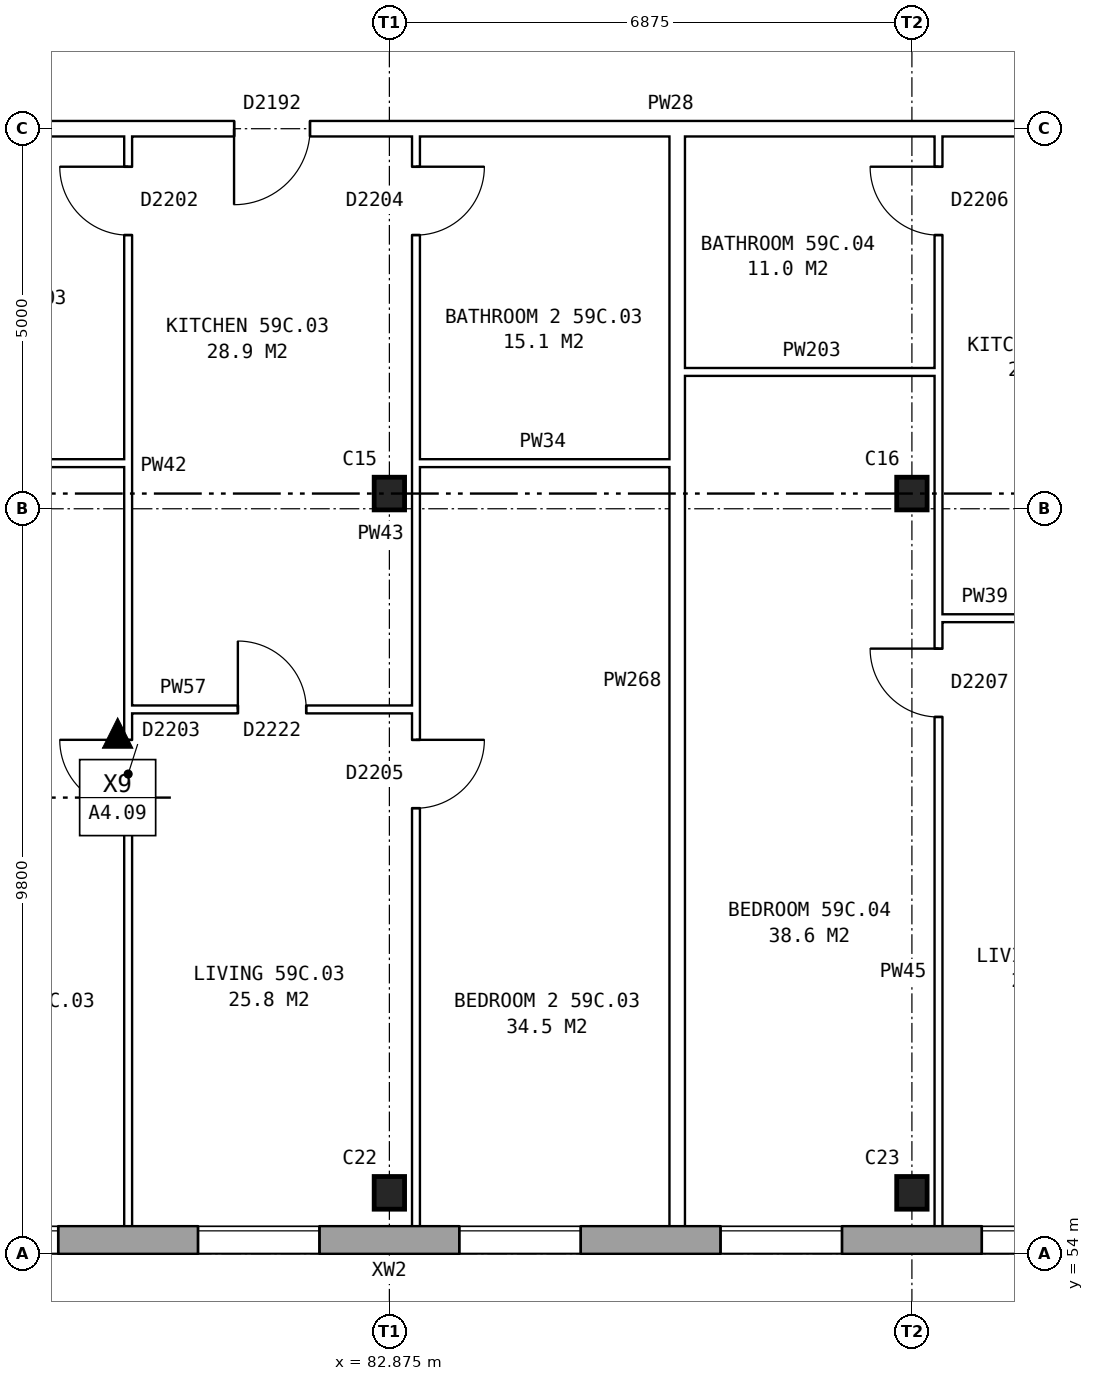
"""IFC4 building model, lengths in metres.
Left out: names, types, materials, properties, quantities, classifications, styles, units other than length and angle.
Written with IfcOpenShell. Run it as: python <this file> out.ifc"""

import sys

from ifc_helpers import new_model, si_unit, direction, frame, frame_2d, origin, origin_2d, place, context, subcontext, project, spatial, rectangle, i_section, extrude, element, fill, save


model = new_model("IFC4")
c1 = context("Model", 3, precision=1e-05, world=origin(), true_north=direction((0.0, 1.0)))
c2 = subcontext(c1, "Body", "Model", "MODEL_VIEW")
j1 = project(units=[si_unit("LENGTHUNIT", "METRE"), si_unit("PLANEANGLEUNIT", "RADIAN")], contexts=[c1])
p1 = place(None, origin())
s1 = spatial("IfcSite", under=j1, at=p1, CompositionType="ELEMENT")
p2 = place(p1, origin())
s2 = spatial("IfcBuilding", under=s1, at=p2, CompositionType="ELEMENT")
p3 = place(p2, frame((0.0, 0.0, 209.0)))
s3 = spatial("IfcBuildingStorey", under=s2, at=p3, CompositionType="ELEMENT", Elevation=209.0)
for number, where, z_axis, x_axis in (
    (1, (82.875, 54.8, 0.0), (0.0, 0.0, 1.0), (1.0, 0.0, 0.0)),
    (2, (89.75, 54.8, 0.0), (0.0, 0.0, 1.0), (1.0, 0.0, 0.0)),
    (3, (82.875, 64.0, 0.0), (0.0, 0.0, 1.0), (1.0, 0.0, 0.0)),
    (4, (89.75, 64.0, 0.0), (0.0, 0.0, 1.0), (1.0, 0.0, 0.0)),
):
    element("IfcColumn", number, at=place(p3, frame(where, z_axis=z_axis, x_axis=x_axis)), inside=s3, PredefinedType="COLUMN", context=c2, shape_type="SweptSolid", body=[
        extrude(i_section(OverallWidth=0.4, OverallDepth=0.43, WebThickness=0.04, FlangeThickness=0.04, at=origin_2d()), origin(), (0.0, 0.0, 1.0), 2.85),
    ])
p4 = place(p3, frame((75.95, 54.18, 0.0), z_axis=(0.0, 0.0, 1.0), x_axis=(1.0, 0.0, 0.0)))
e5 = element("IfcWall", 5, at=p4, inside=s3, PredefinedType="STANDARD", context=c2, shape_type="SweptSolid", body=[
    extrude(rectangle(XDim=55.1, YDim=0.36, at=frame_2d((27.55, 0.0))), origin(), (0.0, 0.0, 1.0), 2.85),
])
p5 = place(p4, frame((0.969, 0.0, 0.8)))
e6 = element("IfcOpeningElement", 6, at=p5, cuts=e5, PredefinedType="OPENING", context=c2, shape_type="SweptSolid", body=[
    extrude(rectangle(XDim=1.6, YDim=1.8, at=frame_2d((0.8, 0.9))), frame((0.0, 0.19, 0.0), z_axis=(0.0, -1.0, 0.0), x_axis=(1.0, 0.0, 0.0)), (0.0, 0.0, 1.0), 0.38),
])
p6 = place(p4, frame((4.406, 0.0, 0.8)))
e7 = element("IfcOpeningElement", 7, at=p6, cuts=e5, PredefinedType="OPENING", context=c2, shape_type="SweptSolid", body=[
    extrude(rectangle(XDim=1.6, YDim=1.8, at=frame_2d((0.8, 0.9))), frame((0.0, 0.19, 0.0), z_axis=(0.0, -1.0, 0.0), x_axis=(1.0, 0.0, 0.0)), (0.0, 0.0, 1.0), 0.38),
])
p7 = place(p4, frame((7.844, 0.0, 0.8)))
e8 = element("IfcOpeningElement", 8, at=p7, cuts=e5, PredefinedType="OPENING", context=c2, shape_type="SweptSolid", body=[
    extrude(rectangle(XDim=1.6, YDim=1.8, at=frame_2d((0.8, 0.9))), frame((0.0, 0.19, 0.0), z_axis=(0.0, -1.0, 0.0), x_axis=(1.0, 0.0, 0.0)), (0.0, 0.0, 1.0), 0.38),
])
p8 = place(p4, frame((11.281, 0.0, 0.8)))
e9 = element("IfcOpeningElement", 9, at=p8, cuts=e5, PredefinedType="OPENING", context=c2, shape_type="SweptSolid", body=[
    extrude(rectangle(XDim=1.6, YDim=1.8, at=frame_2d((0.8, 0.9))), frame((0.0, 0.19, 0.0), z_axis=(0.0, -1.0, 0.0), x_axis=(1.0, 0.0, 0.0)), (0.0, 0.0, 1.0), 0.38),
])
p9 = place(p4, frame((14.719, 0.0, 0.8)))
e10 = element("IfcOpeningElement", 10, at=p9, cuts=e5, PredefinedType="OPENING", context=c2, shape_type="SweptSolid", body=[
    extrude(rectangle(XDim=1.6, YDim=1.8, at=frame_2d((0.8, 0.9))), frame((0.0, 0.19, 0.0), z_axis=(0.0, -1.0, 0.0), x_axis=(1.0, 0.0, 0.0)), (0.0, 0.0, 1.0), 0.38),
])
p10 = place(p4, frame((18.156, 0.0, 0.8)))
e11 = element("IfcOpeningElement", 11, at=p10, cuts=e5, PredefinedType="OPENING", context=c2, shape_type="SweptSolid", body=[
    extrude(rectangle(XDim=1.6, YDim=1.8, at=frame_2d((0.8, 0.9))), frame((0.0, 0.19, 0.0), z_axis=(0.0, -1.0, 0.0), x_axis=(1.0, 0.0, 0.0)), (0.0, 0.0, 1.0), 0.38),
])
p11 = place(p4, frame((21.594, 0.0, 0.8)))
e12 = element("IfcOpeningElement", 12, at=p11, cuts=e5, PredefinedType="OPENING", context=c2, shape_type="SweptSolid", body=[
    extrude(rectangle(XDim=1.6, YDim=1.8, at=frame_2d((0.8, 0.9))), frame((0.0, 0.19, 0.0), z_axis=(0.0, -1.0, 0.0), x_axis=(1.0, 0.0, 0.0)), (0.0, 0.0, 1.0), 0.38),
])
p12 = place(p4, frame((25.031, 0.0, 0.8)))
e13 = element("IfcOpeningElement", 13, at=p12, cuts=e5, PredefinedType="OPENING", context=c2, shape_type="SweptSolid", body=[
    extrude(rectangle(XDim=1.6, YDim=1.8, at=frame_2d((0.8, 0.9))), frame((0.0, 0.19, 0.0), z_axis=(0.0, -1.0, 0.0), x_axis=(1.0, 0.0, 0.0)), (0.0, 0.0, 1.0), 0.38),
])
p13 = place(p4, frame((28.469, 0.0, 0.8)))
e14 = element("IfcOpeningElement", 14, at=p13, cuts=e5, PredefinedType="OPENING", context=c2, shape_type="SweptSolid", body=[
    extrude(rectangle(XDim=1.6, YDim=1.8, at=frame_2d((0.8, 0.9))), frame((0.0, 0.19, 0.0), z_axis=(0.0, -1.0, 0.0), x_axis=(1.0, 0.0, 0.0)), (0.0, 0.0, 1.0), 0.38),
])
p14 = place(p4, frame((31.906, 0.0, 0.8)))
e15 = element("IfcOpeningElement", 15, at=p14, cuts=e5, PredefinedType="OPENING", context=c2, shape_type="SweptSolid", body=[
    extrude(rectangle(XDim=1.6, YDim=1.8, at=frame_2d((0.8, 0.9))), frame((0.0, 0.19, 0.0), z_axis=(0.0, -1.0, 0.0), x_axis=(1.0, 0.0, 0.0)), (0.0, 0.0, 1.0), 0.38),
])
p15 = place(p4, frame((35.344, 0.0, 0.8)))
e16 = element("IfcOpeningElement", 16, at=p15, cuts=e5, PredefinedType="OPENING", context=c2, shape_type="SweptSolid", body=[
    extrude(rectangle(XDim=1.6, YDim=1.8, at=frame_2d((0.8, 0.9))), frame((0.0, 0.19, 0.0), z_axis=(0.0, -1.0, 0.0), x_axis=(1.0, 0.0, 0.0)), (0.0, 0.0, 1.0), 0.38),
])
p16 = place(p4, frame((38.781, 0.0, 0.8)))
e17 = element("IfcOpeningElement", 17, at=p16, cuts=e5, PredefinedType="OPENING", context=c2, shape_type="SweptSolid", body=[
    extrude(rectangle(XDim=1.6, YDim=1.8, at=frame_2d((0.8, 0.9))), frame((0.0, 0.19, 0.0), z_axis=(0.0, -1.0, 0.0), x_axis=(1.0, 0.0, 0.0)), (0.0, 0.0, 1.0), 0.38),
])
p17 = place(p4, frame((42.219, 0.0, 0.8)))
e18 = element("IfcOpeningElement", 18, at=p17, cuts=e5, PredefinedType="OPENING", context=c2, shape_type="SweptSolid", body=[
    extrude(rectangle(XDim=1.6, YDim=1.8, at=frame_2d((0.8, 0.9))), frame((0.0, 0.19, 0.0), z_axis=(0.0, -1.0, 0.0), x_axis=(1.0, 0.0, 0.0)), (0.0, 0.0, 1.0), 0.38),
])
p18 = place(p4, frame((45.656, 0.0, 0.8)))
e19 = element("IfcOpeningElement", 19, at=p18, cuts=e5, PredefinedType="OPENING", context=c2, shape_type="SweptSolid", body=[
    extrude(rectangle(XDim=1.6, YDim=1.8, at=frame_2d((0.8, 0.9))), frame((0.0, 0.19, 0.0), z_axis=(0.0, -1.0, 0.0), x_axis=(1.0, 0.0, 0.0)), (0.0, 0.0, 1.0), 0.38),
])
p19 = place(p4, frame((49.094, 0.0, 0.8)))
e20 = element("IfcOpeningElement", 20, at=p19, cuts=e5, PredefinedType="OPENING", context=c2, shape_type="SweptSolid", body=[
    extrude(rectangle(XDim=1.6, YDim=1.8, at=frame_2d((0.8, 0.9))), frame((0.0, 0.19, 0.0), z_axis=(0.0, -1.0, 0.0), x_axis=(1.0, 0.0, 0.0)), (0.0, 0.0, 1.0), 0.38),
])
p20 = place(p4, frame((52.531, 0.0, 0.8)))
e21 = element("IfcOpeningElement", 21, at=p20, cuts=e5, PredefinedType="OPENING", context=c2, shape_type="SweptSolid", body=[
    extrude(rectangle(XDim=1.6, YDim=1.8, at=frame_2d((0.8, 0.9))), frame((0.0, 0.19, 0.0), z_axis=(0.0, -1.0, 0.0), x_axis=(1.0, 0.0, 0.0)), (0.0, 0.0, 1.0), 0.38),
])
p21 = place(p3, frame((79.438, 61.16, 0.0), z_axis=(0.0, 0.0, 1.0), x_axis=(1.0, 0.0, 0.0)))
e22 = element("IfcWall", 22, at=p21, inside=s3, PredefinedType="PARTITIONING", context=c2, shape_type="SweptSolid", body=[
    extrude(rectangle(XDim=3.787, YDim=0.1, at=frame_2d((1.894, 0.0))), origin(), (0.0, 0.0, 1.0), 2.85),
])
p22 = place(p21, frame((1.444, 0.0, 0.0)))
e23 = element("IfcOpeningElement", 23, at=p22, cuts=e22, PredefinedType="OPENING", context=c2, shape_type="SweptSolid", body=[
    extrude(rectangle(XDim=0.9, YDim=2.1, at=frame_2d((0.45, 1.05))), frame((0.0, 0.06, 0.0), z_axis=(0.0, -1.0, 0.0), x_axis=(1.0, 0.0, 0.0)), (0.0, 0.0, 1.0), 0.12),
])
p23 = place(p3, frame((90.1, 62.36, 0.0), z_axis=(0.0, 0.0, 1.0), x_axis=(1.0, 0.0, 0.0)))
e24 = element("IfcWall", 24, at=p23, inside=s3, PredefinedType="PARTITIONING", context=c2, shape_type="SweptSolid", body=[
    extrude(rectangle(XDim=3.337, YDim=0.1, at=frame_2d((1.668, 0.0))), origin(), (0.0, 0.0, 1.0), 2.85),
])
p24 = place(p23, frame((1.219, 0.0, 0.0)))
e25 = element("IfcOpeningElement", 25, at=p24, cuts=e24, PredefinedType="OPENING", context=c2, shape_type="SweptSolid", body=[
    extrude(rectangle(XDim=0.9, YDim=2.1, at=frame_2d((0.45, 1.05))), frame((0.0, 0.06, 0.0), z_axis=(0.0, -1.0, 0.0), x_axis=(1.0, 0.0, 0.0)), (0.0, 0.0, 1.0), 0.12),
])
p25 = place(p3, frame((75.64, 64.4, 0.0), z_axis=(0.0, 0.0, 1.0), x_axis=(1.0, 0.0, 0.0)))
e26 = element("IfcWall", 26, at=p25, inside=s3, PredefinedType="PARTITIONING", context=c2, shape_type="SweptSolid", body=[
    extrude(rectangle(XDim=3.798, YDim=0.1, at=frame_2d((1.899, 0.0))), origin(), (0.0, 0.0, 1.0), 2.85),
])
p26 = place(p3, frame((83.225, 64.4, 0.0), z_axis=(0.0, 0.0, 1.0), x_axis=(1.0, 0.0, 0.0)))
e27 = element("IfcWall", 27, at=p26, inside=s3, PredefinedType="PARTITIONING", context=c2, shape_type="SweptSolid", body=[
    extrude(rectangle(XDim=3.337, YDim=0.1, at=frame_2d((1.668, 0.0))), origin(), (0.0, 0.0, 1.0), 2.85),
])
p27 = place(p3, frame((86.762, 65.6, 0.0), z_axis=(0.0, 0.0, 1.0), x_axis=(1.0, 0.0, 0.0)))
e28 = element("IfcWall", 28, at=p27, inside=s3, PredefinedType="PARTITIONING", context=c2, shape_type="SweptSolid", body=[
    extrude(rectangle(XDim=3.338, YDim=0.1, at=frame_2d((1.669, 0.0))), origin(), (0.0, 0.0, 1.0), 2.85),
])
p28 = place(p3, frame((75.64, 68.8, 0.0), z_axis=(0.0, 0.0, 1.0), x_axis=(1.0, 0.0, 0.0)))
e29 = element("IfcWall", 29, at=p28, inside=s3, PredefinedType="PARTITIONING", context=c2, shape_type="SweptSolid", body=[
    extrude(rectangle(XDim=55.72, YDim=0.2, at=frame_2d((27.86, 0.0))), origin(), (0.0, 0.0, 1.0), 2.85),
])
p29 = place(p28, frame((5.191, 0.0, 0.0)))
e30 = element("IfcOpeningElement", 30, at=p29, cuts=e29, PredefinedType="OPENING", context=c2, shape_type="SweptSolid", body=[
    extrude(rectangle(XDim=1.0, YDim=2.1, at=frame_2d((0.5, 1.05))), frame((0.0, 0.11, 0.0), z_axis=(0.0, -1.0, 0.0), x_axis=(1.0, 0.0, 0.0)), (0.0, 0.0, 1.0), 0.22),
])
p30 = place(p28, frame((15.678, 0.0, 0.0)))
e31 = element("IfcOpeningElement", 31, at=p30, cuts=e29, PredefinedType="OPENING", context=c2, shape_type="SweptSolid", body=[
    extrude(rectangle(XDim=1.0, YDim=2.1, at=frame_2d((0.5, 1.05))), frame((0.0, 0.11, 0.0), z_axis=(0.0, -1.0, 0.0), x_axis=(1.0, 0.0, 0.0)), (0.0, 0.0, 1.0), 0.22),
])
p31 = place(p28, frame((22.553, 0.0, 0.0)))
e32 = element("IfcOpeningElement", 32, at=p31, cuts=e29, PredefinedType="OPENING", context=c2, shape_type="SweptSolid", body=[
    extrude(rectangle(XDim=1.0, YDim=2.1, at=frame_2d((0.5, 1.05))), frame((0.0, 0.11, 0.0), z_axis=(0.0, -1.0, 0.0), x_axis=(1.0, 0.0, 0.0)), (0.0, 0.0, 1.0), 0.22),
])
p32 = place(p28, frame((32.866, 0.0, 0.0)))
e33 = element("IfcOpeningElement", 33, at=p32, cuts=e29, PredefinedType="OPENING", context=c2, shape_type="SweptSolid", body=[
    extrude(rectangle(XDim=1.0, YDim=2.1, at=frame_2d((0.5, 1.05))), frame((0.0, 0.11, 0.0), z_axis=(0.0, -1.0, 0.0), x_axis=(1.0, 0.0, 0.0)), (0.0, 0.0, 1.0), 0.22),
])
p33 = place(p28, frame((43.178, 0.0, 0.0)))
e34 = element("IfcOpeningElement", 34, at=p33, cuts=e29, PredefinedType="OPENING", context=c2, shape_type="SweptSolid", body=[
    extrude(rectangle(XDim=1.0, YDim=2.1, at=frame_2d((0.5, 1.05))), frame((0.0, 0.11, 0.0), z_axis=(0.0, -1.0, 0.0), x_axis=(1.0, 0.0, 0.0)), (0.0, 0.0, 1.0), 0.22),
])
p34 = place(p28, frame((50.053, 0.0, 0.0)))
e35 = element("IfcOpeningElement", 35, at=p34, cuts=e29, PredefinedType="OPENING", context=c2, shape_type="SweptSolid", body=[
    extrude(rectangle(XDim=1.0, YDim=2.1, at=frame_2d((0.5, 1.05))), frame((0.0, 0.11, 0.0), z_axis=(0.0, -1.0, 0.0), x_axis=(1.0, 0.0, 0.0)), (0.0, 0.0, 1.0), 0.22),
])
p35 = place(p3, frame((79.438, 54.36, 0.0), z_axis=(0.0, 0.0, 1.0), x_axis=(0.0, 1.0, 0.0)))
e36 = element("IfcWall", 36, at=p35, inside=s3, PredefinedType="PARTITIONING", context=c2, shape_type="SweptSolid", body=[
    extrude(rectangle(XDim=14.34, YDim=0.1, at=frame_2d((7.17, 0.0))), origin(), (0.0, 0.0, 1.0), 2.85),
])
p36 = place(p35, frame((5.5, 0.0, 0.0)))
e37 = element("IfcOpeningElement", 37, at=p36, cuts=e36, PredefinedType="OPENING", context=c2, shape_type="SweptSolid", body=[
    extrude(rectangle(XDim=0.9, YDim=2.1, at=frame_2d((0.45, 1.05))), frame((0.0, 0.06, 0.0), z_axis=(0.0, -1.0, 0.0), x_axis=(1.0, 0.0, 0.0)), (0.0, 0.0, 1.0), 0.12),
])
p37 = place(p35, frame((13.04, 0.0, 0.0)))
e38 = element("IfcOpeningElement", 38, at=p37, cuts=e36, PredefinedType="OPENING", context=c2, shape_type="SweptSolid", body=[
    extrude(rectangle(XDim=0.9, YDim=2.1, at=frame_2d((0.45, 1.05))), frame((0.0, 0.06, 0.0), z_axis=(0.0, -1.0, 0.0), x_axis=(1.0, 0.0, 0.0)), (0.0, 0.0, 1.0), 0.12),
])
p38 = place(p3, frame((83.225, 54.36, 0.0), z_axis=(0.0, 0.0, 1.0), x_axis=(0.0, 1.0, 0.0)))
e39 = element("IfcWall", 39, at=p38, inside=s3, PredefinedType="PARTITIONING", context=c2, shape_type="SweptSolid", body=[
    extrude(rectangle(XDim=14.34, YDim=0.1, at=frame_2d((7.17, 0.0))), origin(), (0.0, 0.0, 1.0), 2.85),
])
p39 = place(p38, frame((5.5, 0.0, 0.0)))
e40 = element("IfcOpeningElement", 40, at=p39, cuts=e39, PredefinedType="OPENING", context=c2, shape_type="SweptSolid", body=[
    extrude(rectangle(XDim=0.9, YDim=2.1, at=frame_2d((0.45, 1.05))), frame((0.0, 0.06, 0.0), z_axis=(0.0, -1.0, 0.0), x_axis=(1.0, 0.0, 0.0)), (0.0, 0.0, 1.0), 0.12),
])
p40 = place(p38, frame((13.04, 0.0, 0.0)))
e41 = element("IfcOpeningElement", 41, at=p40, cuts=e39, PredefinedType="OPENING", context=c2, shape_type="SweptSolid", body=[
    extrude(rectangle(XDim=0.9, YDim=2.1, at=frame_2d((0.45, 1.05))), frame((0.0, 0.06, 0.0), z_axis=(0.0, -1.0, 0.0), x_axis=(1.0, 0.0, 0.0)), (0.0, 0.0, 1.0), 0.12),
])
p41 = place(p3, frame((86.662, 54.36, 0.0), z_axis=(0.0, 0.0, 1.0), x_axis=(0.0, 1.0, 0.0)))
e42 = element("IfcWall", 42, at=p41, inside=s3, PredefinedType="PARTITIONING", context=c2, shape_type="SweptSolid", body=[
    extrude(rectangle(XDim=14.34, YDim=0.2, at=frame_2d((7.17, 0.0))), origin(), (0.0, 0.0, 1.0), 2.85),
])
p42 = place(p3, frame((90.1, 54.36, 0.0), z_axis=(0.0, 0.0, 1.0), x_axis=(0.0, 1.0, 0.0)))
e43 = element("IfcWall", 43, at=p42, inside=s3, PredefinedType="PARTITIONING", context=c2, shape_type="SweptSolid", body=[
    extrude(rectangle(XDim=14.34, YDim=0.1, at=frame_2d((7.17, 0.0))), origin(), (0.0, 0.0, 1.0), 2.85),
])
p43 = place(p42, frame((6.7, 0.0, 0.0)))
e44 = element("IfcOpeningElement", 44, at=p43, cuts=e43, PredefinedType="OPENING", context=c2, shape_type="SweptSolid", body=[
    extrude(rectangle(XDim=0.9, YDim=2.1, at=frame_2d((0.45, 1.05))), frame((0.0, 0.06, 0.0), z_axis=(0.0, -1.0, 0.0), x_axis=(1.0, 0.0, 0.0)), (0.0, 0.0, 1.0), 0.12),
])
p44 = place(p42, frame((13.04, 0.0, 0.0)))
e45 = element("IfcOpeningElement", 45, at=p44, cuts=e43, PredefinedType="OPENING", context=c2, shape_type="SweptSolid", body=[
    extrude(rectangle(XDim=0.9, YDim=2.1, at=frame_2d((0.45, 1.05))), frame((0.0, 0.06, 0.0), z_axis=(0.0, -1.0, 0.0), x_axis=(1.0, 0.0, 0.0)), (0.0, 0.0, 1.0), 0.12),
])
p45 = place(p5, origin())
e46 = element("IfcWindow", 46, at=p45, inside=s3, PartitioningType="SINGLE_PANEL", PredefinedType="WINDOW", context=c2, shape_type="SweptSolid", body=[
    extrude(rectangle(XDim=1.6, YDim=1.8, at=frame_2d((0.8, 0.9))), frame((0.0, 0.15, 0.0), z_axis=(0.0, -1.0, 0.0), x_axis=(1.0, 0.0, 0.0)), (0.0, 0.0, 1.0), 0.06),
])
fill(e6, e46)
p46 = place(p6, origin())
e47 = element("IfcWindow", 47, at=p46, inside=s3, PartitioningType="SINGLE_PANEL", PredefinedType="WINDOW", context=c2, shape_type="SweptSolid", body=[
    extrude(rectangle(XDim=1.6, YDim=1.8, at=frame_2d((0.8, 0.9))), frame((0.0, 0.15, 0.0), z_axis=(0.0, -1.0, 0.0), x_axis=(1.0, 0.0, 0.0)), (0.0, 0.0, 1.0), 0.06),
])
fill(e7, e47)
p47 = place(p7, origin())
e48 = element("IfcWindow", 48, at=p47, inside=s3, PartitioningType="SINGLE_PANEL", PredefinedType="WINDOW", context=c2, shape_type="SweptSolid", body=[
    extrude(rectangle(XDim=1.6, YDim=1.8, at=frame_2d((0.8, 0.9))), frame((0.0, 0.15, 0.0), z_axis=(0.0, -1.0, 0.0), x_axis=(1.0, 0.0, 0.0)), (0.0, 0.0, 1.0), 0.06),
])
fill(e8, e48)
p48 = place(p8, origin())
e49 = element("IfcWindow", 49, at=p48, inside=s3, PartitioningType="SINGLE_PANEL", PredefinedType="WINDOW", context=c2, shape_type="SweptSolid", body=[
    extrude(rectangle(XDim=1.6, YDim=1.8, at=frame_2d((0.8, 0.9))), frame((0.0, 0.15, 0.0), z_axis=(0.0, -1.0, 0.0), x_axis=(1.0, 0.0, 0.0)), (0.0, 0.0, 1.0), 0.06),
])
fill(e9, e49)
p49 = place(p9, origin())
e50 = element("IfcWindow", 50, at=p49, inside=s3, PartitioningType="SINGLE_PANEL", PredefinedType="WINDOW", context=c2, shape_type="SweptSolid", body=[
    extrude(rectangle(XDim=1.6, YDim=1.8, at=frame_2d((0.8, 0.9))), frame((0.0, 0.15, 0.0), z_axis=(0.0, -1.0, 0.0), x_axis=(1.0, 0.0, 0.0)), (0.0, 0.0, 1.0), 0.06),
])
fill(e10, e50)
p50 = place(p36, origin())
e51 = element("IfcDoor", 51, at=p50, inside=s3, OperationType="SINGLE_SWING_RIGHT", PredefinedType="DOOR", context=c2, shape_type="SweptSolid", body=[
    extrude(rectangle(XDim=0.9, YDim=2.1, at=frame_2d((0.45, 1.05))), frame((0.0, 0.025, 0.0), z_axis=(0.0, -1.0, 0.0), x_axis=(1.0, 0.0, 0.0)), (0.0, 0.0, 1.0), 0.05),
])
fill(e37, e51)
p51 = place(p39, frame((0.9, 0.0, 0.0), z_axis=(0.0, 0.0, 1.0), x_axis=(-1.0, 0.0, 0.0)))
e52 = element("IfcDoor", 52, at=p51, inside=s3, OperationType="SINGLE_SWING_LEFT", PredefinedType="DOOR", context=c2, shape_type="SweptSolid", body=[
    extrude(rectangle(XDim=0.9, YDim=2.1, at=frame_2d((0.45, 1.05))), frame((0.0, 0.025, 0.0), z_axis=(0.0, -1.0, 0.0), x_axis=(1.0, 0.0, 0.0)), (0.0, 0.0, 1.0), 0.05),
])
fill(e40, e52)
p52 = place(p29, frame((1.0, 0.0, 0.0), z_axis=(0.0, 0.0, 1.0), x_axis=(-1.0, 0.0, 0.0)))
e53 = element("IfcDoor", 53, at=p52, inside=s3, OperationType="SINGLE_SWING_RIGHT", PredefinedType="DOOR", context=c2, shape_type="SweptSolid", body=[
    extrude(rectangle(XDim=1.0, YDim=2.1, at=frame_2d((0.5, 1.05))), frame((0.0, 0.025, 0.0), z_axis=(0.0, -1.0, 0.0), x_axis=(1.0, 0.0, 0.0)), (0.0, 0.0, 1.0), 0.05),
])
fill(e30, e53)
p53 = place(p22, origin())
e54 = element("IfcDoor", 54, at=p53, inside=s3, OperationType="SINGLE_SWING_LEFT", PredefinedType="DOOR", context=c2, shape_type="SweptSolid", body=[
    extrude(rectangle(XDim=0.9, YDim=2.1, at=frame_2d((0.45, 1.05))), frame((0.0, 0.025, 0.0), z_axis=(0.0, -1.0, 0.0), x_axis=(1.0, 0.0, 0.0)), (0.0, 0.0, 1.0), 0.05),
])
fill(e23, e54)
p54 = place(p37, origin())
e55 = element("IfcDoor", 55, at=p54, inside=s3, OperationType="SINGLE_SWING_RIGHT", PredefinedType="DOOR", context=c2, shape_type="SweptSolid", body=[
    extrude(rectangle(XDim=0.9, YDim=2.1, at=frame_2d((0.45, 1.05))), frame((0.0, 0.025, 0.0), z_axis=(0.0, -1.0, 0.0), x_axis=(1.0, 0.0, 0.0)), (0.0, 0.0, 1.0), 0.05),
])
fill(e38, e55)
p55 = place(p40, frame((0.9, 0.0, 0.0), z_axis=(0.0, 0.0, 1.0), x_axis=(-1.0, 0.0, 0.0)))
e56 = element("IfcDoor", 56, at=p55, inside=s3, OperationType="SINGLE_SWING_LEFT", PredefinedType="DOOR", context=c2, shape_type="SweptSolid", body=[
    extrude(rectangle(XDim=0.9, YDim=2.1, at=frame_2d((0.45, 1.05))), frame((0.0, 0.025, 0.0), z_axis=(0.0, -1.0, 0.0), x_axis=(1.0, 0.0, 0.0)), (0.0, 0.0, 1.0), 0.05),
])
fill(e41, e56)
p56 = place(p43, origin())
e57 = element("IfcDoor", 57, at=p56, inside=s3, OperationType="SINGLE_SWING_RIGHT", PredefinedType="DOOR", context=c2, shape_type="SweptSolid", body=[
    extrude(rectangle(XDim=0.9, YDim=2.1, at=frame_2d((0.45, 1.05))), frame((0.0, 0.025, 0.0), z_axis=(0.0, -1.0, 0.0), x_axis=(1.0, 0.0, 0.0)), (0.0, 0.0, 1.0), 0.05),
])
fill(e44, e57)
p57 = place(p44, origin())
e58 = element("IfcDoor", 58, at=p57, inside=s3, OperationType="SINGLE_SWING_RIGHT", PredefinedType="DOOR", context=c2, shape_type="SweptSolid", body=[
    extrude(rectangle(XDim=0.9, YDim=2.1, at=frame_2d((0.45, 1.05))), frame((0.0, 0.025, 0.0), z_axis=(0.0, -1.0, 0.0), x_axis=(1.0, 0.0, 0.0)), (0.0, 0.0, 1.0), 0.05),
])
fill(e45, e58)
save(model, sys.argv[1])
